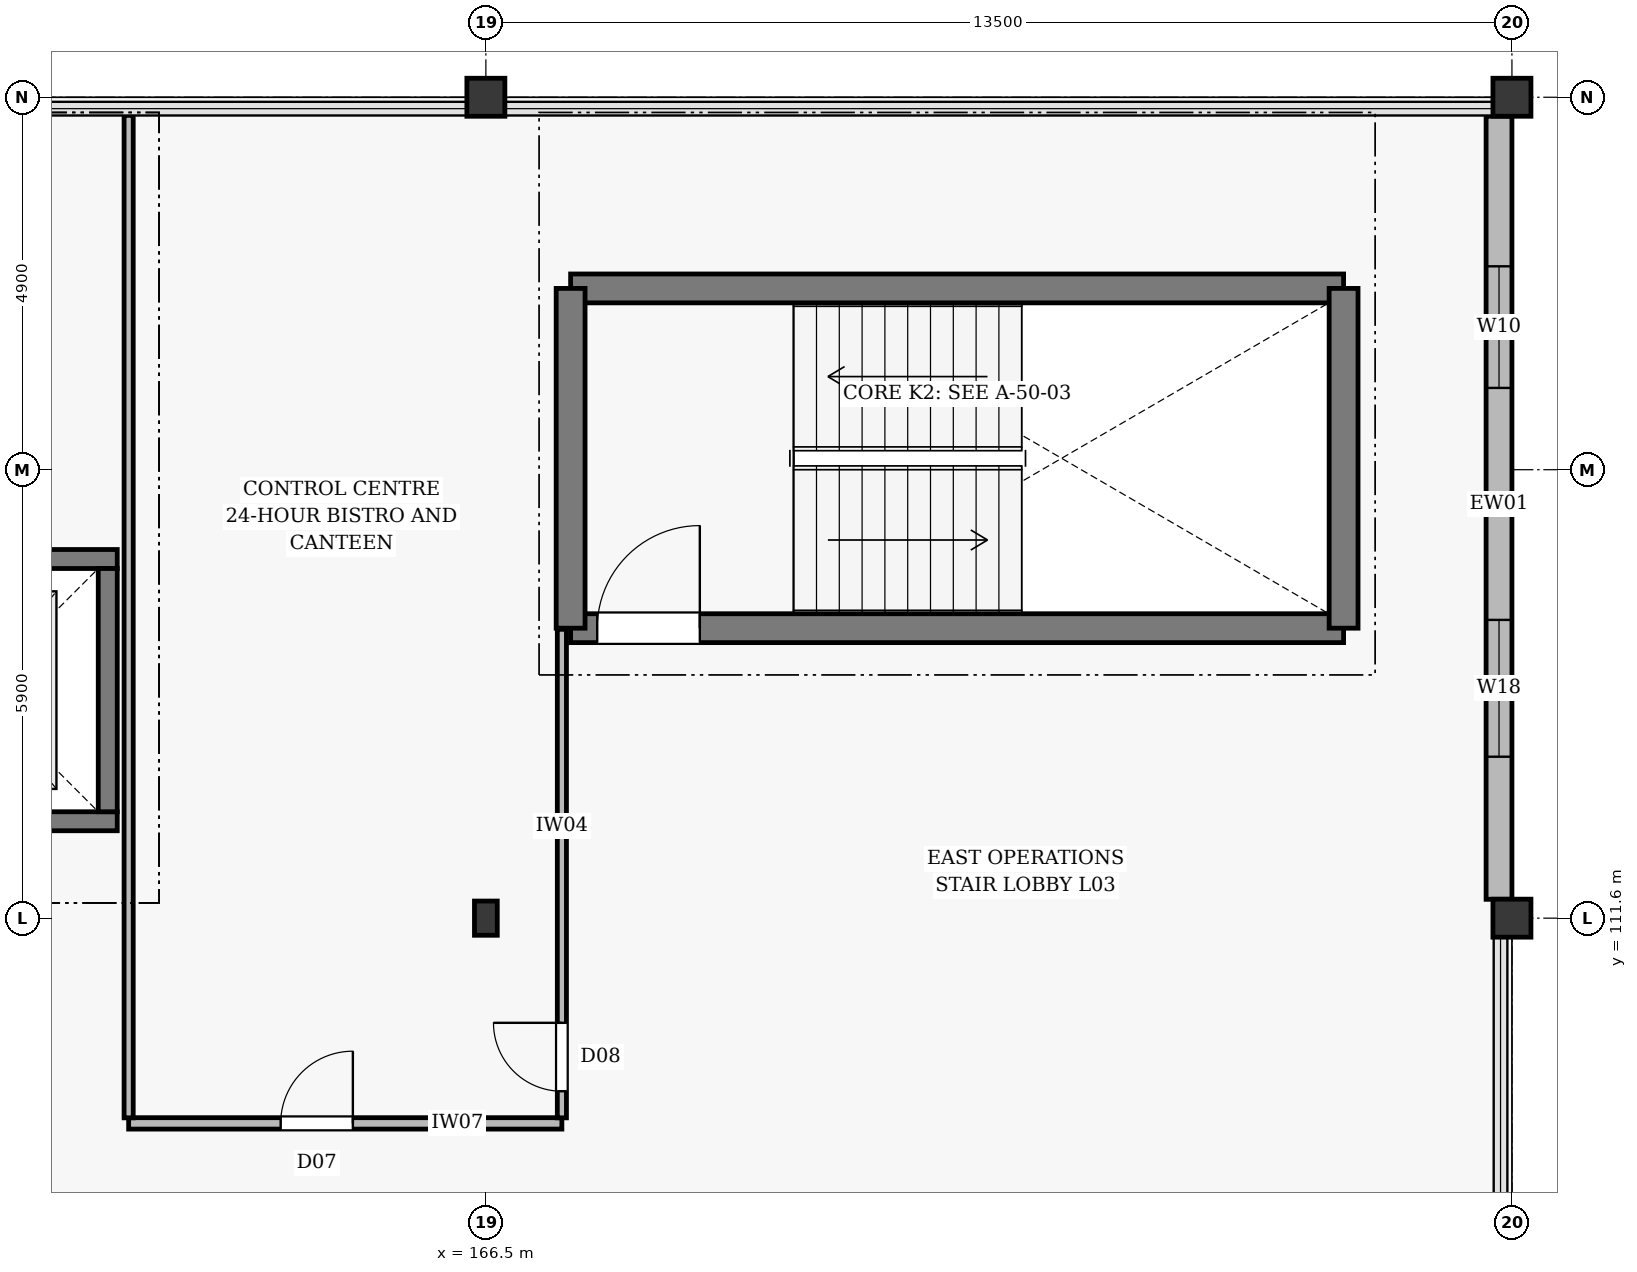
"""IFC4 building model, lengths in metres.
Left out: names, types, materials, properties, quantities, classifications, styles, units other than length and angle.
Written with IfcOpenShell. Run it as: python <this file> out.ifc"""

import sys

from ifc_helpers import new_model, si_unit, direction, frame, frame_2d, origin, origin_2d, place, context, subcontext, project, spatial, rectangle, i_section, extrude, element, fill, save


model = new_model("IFC4")
c1 = context("Model", 3, precision=1e-05, world=origin(), true_north=direction((0.0, 1.0)))
c2 = subcontext(c1, "Body", "Model", "MODEL_VIEW")
j1 = project(units=[si_unit("LENGTHUNIT", "METRE"), si_unit("PLANEANGLEUNIT", "RADIAN")], contexts=[c1])
p1 = place(None, origin())
s1 = spatial("IfcSite", under=j1, at=p1, CompositionType="ELEMENT")
p2 = place(p1, origin())
s2 = spatial("IfcBuilding", under=s1, at=p2, CompositionType="ELEMENT")
p3 = place(p2, frame((0.0, 0.0, 17.4)))
s3 = spatial("IfcBuildingStorey", under=s2, at=p3, CompositionType="ELEMENT", Elevation=17.4)
p4 = place(p3, frame((166.5, 111.6, 0.0), z_axis=(0.0, 0.0, 1.0), x_axis=(1.0, 0.0, 0.0)))
e1 = element("IfcColumn", 1, at=p4, inside=s3, PredefinedType="COLUMN", context=c2, shape_type="SweptSolid", body=[
    extrude(i_section(OverallWidth=0.3, OverallDepth=0.45, WebThickness=0.014, FlangeThickness=0.026, at=origin_2d()), origin(), (0.0, 0.0, 1.0), 3.9),
])
for number, where, z_axis, x_axis in (
    (2, (166.5, 122.4, 0.0), (0.0, 0.0, 1.0), (1.0, 0.0, 0.0)),
    (3, (180.0, 111.6, 0.0), (0.0, 0.0, 1.0), (1.0, 0.0, 0.0)),
    (4, (180.0, 122.4, 0.0), (0.0, 0.0, 1.0), (1.0, 0.0, 0.0)),
):
    element("IfcColumn", number, at=place(p3, frame(where, z_axis=z_axis, x_axis=x_axis)), inside=s3, PredefinedType="COLUMN", context=c2, shape_type="SweptSolid", body=[
        extrude(rectangle(XDim=0.5, YDim=0.5, at=origin_2d()), origin(), (0.0, 0.0, 1.0), 3.9),
    ])
p5 = place(p3, frame((179.83, 122.152, 0.0), z_axis=(0.0, 0.0, 1.0), x_axis=(0.0, -1.0, 0.0)))
e5 = element("IfcWall", 5, at=p5, inside=s3, PredefinedType="STANDARD", context=c2, shape_type="SweptSolid", body=[
    extrude(rectangle(XDim=10.304, YDim=0.34, at=frame_2d((5.152, 0.0))), origin(), (0.0, 0.0, 1.0), 3.12),
])
p6 = place(p5, frame((1.976, 0.0, 0.75)))
e6 = element("IfcOpeningElement", 6, at=p6, cuts=e5, PredefinedType="OPENING", context=c2, shape_type="SweptSolid", body=[
    extrude(rectangle(XDim=1.6, YDim=2.1, at=frame_2d((0.8, 1.05))), frame((0.0, 0.182, 0.0), z_axis=(0.0, -1.0, 0.0), x_axis=(1.0, 0.0, 0.0)), (0.0, 0.0, 1.0), 0.364),
])
p7 = place(p5, frame((6.628, 0.0, 1.05)))
e7 = element("IfcOpeningElement", 7, at=p7, cuts=e5, PredefinedType="OPENING", context=c2, shape_type="SweptSolid", body=[
    extrude(rectangle(XDim=1.8, YDim=1.1, at=frame_2d((0.9, 0.55))), frame((0.0, 0.182, 0.0), z_axis=(0.0, -1.0, 0.0), x_axis=(1.0, 0.0, 0.0)), (0.0, 0.0, 1.0), 0.364),
])
p8 = place(p3, frame((167.615, 115.415, 0.0), z_axis=(0.0, 0.0, 1.0), x_axis=(1.0, 0.0, 0.0)))
e8 = element("IfcWall", 8, at=p8, inside=s3, PredefinedType="SOLIDWALL", context=c2, shape_type="SweptSolid", body=[
    extrude(rectangle(XDim=10.17, YDim=0.38, at=frame_2d((5.085, 0.0))), origin(), (0.0, 0.0, 1.0), 3.9),
])
p9 = place(p8, frame((0.35, 0.0, 0.005)))
e9 = element("IfcOpeningElement", 9, at=p9, cuts=e8, PredefinedType="OPENING", context=c2, shape_type="SweptSolid", body=[
    extrude(rectangle(XDim=1.35, YDim=2.15, at=frame_2d((0.675, 1.075))), frame((0.0, 0.202, 0.0), z_axis=(0.0, -1.0, 0.0), x_axis=(1.0, 0.0, 0.0)), (0.0, 0.0, 1.0), 0.404),
])
p10 = place(p3, frame((167.615, 119.885, 0.0), z_axis=(0.0, 0.0, 1.0), x_axis=(1.0, 0.0, 0.0)))
e10 = element("IfcWall", 10, at=p10, inside=s3, PredefinedType="SOLIDWALL", context=c2, shape_type="SweptSolid", body=[
    extrude(rectangle(XDim=10.17, YDim=0.38, at=frame_2d((5.085, 0.0))), origin(), (0.0, 0.0, 1.0), 3.9),
])
for number, where, z_axis, x_axis in (
    (11, (167.615, 115.415, 0.0), (0.0, 0.0, 1.0), (0.0, 1.0, 0.0)),
    (12, (177.785, 115.415, 0.0), (0.0, 0.0, 1.0), (0.0, 1.0, 0.0)),
):
    element("IfcWall", number, at=place(p3, frame(where, z_axis=z_axis, x_axis=x_axis)), inside=s3, PredefinedType="SOLIDWALL", context=c2, shape_type="SweptSolid", body=[
        extrude(rectangle(XDim=4.47, YDim=0.38, at=frame_2d((2.235, 0.0))), origin(), (0.0, 0.0, 1.0), 3.9),
    ])
p11 = place(p3, frame((157.95, 112.875, 0.0), z_axis=(0.0, 0.0, 1.0), x_axis=(1.0, 0.0, 0.0)))
e13 = element("IfcWall", 13, at=p11, inside=s3, PredefinedType="SOLIDWALL", context=c2, shape_type="SweptSolid", body=[
    extrude(rectangle(XDim=3.7, YDim=0.25, at=frame_2d((1.85, 0.0))), origin(), (0.0, 0.0, 1.0), 3.9),
])
p12 = place(p11, frame((1.225, 0.0, 0.005)))
e14 = element("IfcOpeningElement", 14, at=p12, cuts=e13, PredefinedType="OPENING", context=c2, shape_type="SweptSolid", body=[
    extrude(rectangle(XDim=1.25, YDim=2.2, at=frame_2d((0.625, 1.1))), frame((0.0, 0.137, 0.0), z_axis=(0.0, -1.0, 0.0), x_axis=(1.0, 0.0, 0.0)), (0.0, 0.0, 1.0), 0.274),
])
p13 = place(p3, frame((157.95, 116.325, 0.0), z_axis=(0.0, 0.0, 1.0), x_axis=(1.0, 0.0, 0.0)))
e15 = element("IfcWall", 15, at=p13, inside=s3, PredefinedType="SOLIDWALL", context=c2, shape_type="SweptSolid", body=[
    extrude(rectangle(XDim=3.7, YDim=0.25, at=frame_2d((1.85, 0.0))), origin(), (0.0, 0.0, 1.0), 3.9),
])
p14 = place(p3, frame((161.525, 113.0, 0.0), z_axis=(0.0, 0.0, 1.0), x_axis=(0.0, 1.0, 0.0)))
e16 = element("IfcWall", 16, at=p14, inside=s3, PredefinedType="SOLIDWALL", context=c2, shape_type="SweptSolid", body=[
    extrude(rectangle(XDim=3.2, YDim=0.25, at=frame_2d((1.6, 0.0))), origin(), (0.0, 0.0, 1.0), 3.9),
])
p15 = place(p3, frame((161.8, 108.9, 0.0), z_axis=(0.0, 0.0, 1.0), x_axis=(1.0, 0.0, 0.0)))
e17 = element("IfcWall", 17, at=p15, inside=s3, PredefinedType="PARTITIONING", context=c2, shape_type="SweptSolid", body=[
    extrude(rectangle(XDim=5.7, YDim=0.15, at=frame_2d((2.85, 0.0))), origin(), (0.0, 0.0, 1.0), 3.31),
])
p16 = place(p15, frame((2.0, 0.0, 0.005)))
e18 = element("IfcOpeningElement", 18, at=p16, cuts=e17, PredefinedType="OPENING", context=c2, shape_type="SweptSolid", body=[
    extrude(rectangle(XDim=0.95, YDim=2.1, at=frame_2d((0.475, 1.05))), frame((0.0, 0.087, 0.0), z_axis=(0.0, -1.0, 0.0), x_axis=(1.0, 0.0, 0.0)), (0.0, 0.0, 1.0), 0.174),
])
p17 = place(p3, frame((167.5, 108.973, 0.0), z_axis=(0.0, 0.0, 1.0), x_axis=(0.0, 1.0, 0.0)))
e19 = element("IfcWall", 19, at=p17, inside=s3, PredefinedType="PARTITIONING", context=c2, shape_type="SweptSolid", body=[
    extrude(rectangle(XDim=6.427, YDim=0.12, at=frame_2d((3.213, 0.0))), origin(), (0.0, 0.0, 1.0), 3.12),
])
p18 = place(p17, frame((0.35, 0.0, 0.005)))
e20 = element("IfcOpeningElement", 20, at=p18, cuts=e19, PredefinedType="OPENING", context=c2, shape_type="SweptSolid", body=[
    extrude(rectangle(XDim=0.9, YDim=2.1, at=frame_2d((0.45, 1.05))), frame((0.0, 0.072, 0.0), z_axis=(0.0, -1.0, 0.0), x_axis=(1.0, 0.0, 0.0)), (0.0, 0.0, 1.0), 0.144),
])
p19 = place(p3, frame((161.8, 108.973, 0.0), z_axis=(0.0, 0.0, 1.0), x_axis=(0.0, 1.0, 0.0)))
e21 = element("IfcWall", 21, at=p19, inside=s3, PredefinedType="PARTITIONING", context=c2, shape_type="SweptSolid", body=[
    extrude(rectangle(XDim=13.189, YDim=0.12, at=frame_2d((6.595, 0.0))), origin(), (0.0, 0.0, 1.0), 3.12),
])
p20 = place(p6, origin())
e22 = element("IfcWindow", 22, at=p20, inside=s3, PartitioningType="DOUBLE_PANEL_VERTICAL", PredefinedType="WINDOW", context=c2, shape_type="SweptSolid", body=[
    extrude(rectangle(XDim=1.6, YDim=2.1, at=frame_2d((0.8, 1.05))), frame((0.0, 0.03, 0.0), z_axis=(0.0, -1.0, 0.0), x_axis=(1.0, 0.0, 0.0)), (0.0, 0.0, 1.0), 0.06),
])
fill(e6, e22)
p21 = place(p7, origin())
e23 = element("IfcWindow", 23, at=p21, inside=s3, PartitioningType="DOUBLE_PANEL_VERTICAL", PredefinedType="WINDOW", context=c2, shape_type="SweptSolid", body=[
    extrude(rectangle(XDim=1.8, YDim=1.1, at=frame_2d((0.9, 0.55))), frame((0.0, 0.03, 0.0), z_axis=(0.0, -1.0, 0.0), x_axis=(1.0, 0.0, 0.0)), (0.0, 0.0, 1.0), 0.06),
])
fill(e7, e23)
p22 = place(p9, origin())
e24 = element("IfcDoor", 24, at=p22, inside=s3, OperationType="SINGLE_SWING_RIGHT", PredefinedType="DOOR", context=c2, shape_type="SweptSolid", body=[
    extrude(rectangle(XDim=1.35, YDim=2.15, at=frame_2d((0.675, 1.075))), frame((0.0, 0.025, 0.0), z_axis=(0.0, -1.0, 0.0), x_axis=(1.0, 0.0, 0.0)), (0.0, 0.0, 1.0), 0.05),
])
fill(e9, e24)
p23 = place(p16, origin())
e25 = element("IfcDoor", 25, at=p23, inside=s3, OperationType="SINGLE_SWING_RIGHT", PredefinedType="DOOR", context=c2, shape_type="SweptSolid", body=[
    extrude(rectangle(XDim=0.95, YDim=2.1, at=frame_2d((0.475, 1.05))), frame((0.0, 0.025, 0.0), z_axis=(0.0, -1.0, 0.0), x_axis=(1.0, 0.0, 0.0)), (0.0, 0.0, 1.0), 0.05),
])
fill(e18, e25)
p24 = place(p18, origin())
e26 = element("IfcDoor", 26, at=p24, inside=s3, OperationType="SINGLE_SWING_RIGHT", PredefinedType="DOOR", context=c2, shape_type="SweptSolid", body=[
    extrude(rectangle(XDim=0.9, YDim=2.1, at=frame_2d((0.45, 1.05))), frame((0.0, 0.025, 0.0), z_axis=(0.0, -1.0, 0.0), x_axis=(1.0, 0.0, 0.0)), (0.0, 0.0, 1.0), 0.05),
])
fill(e20, e26)
save(model, sys.argv[1])
